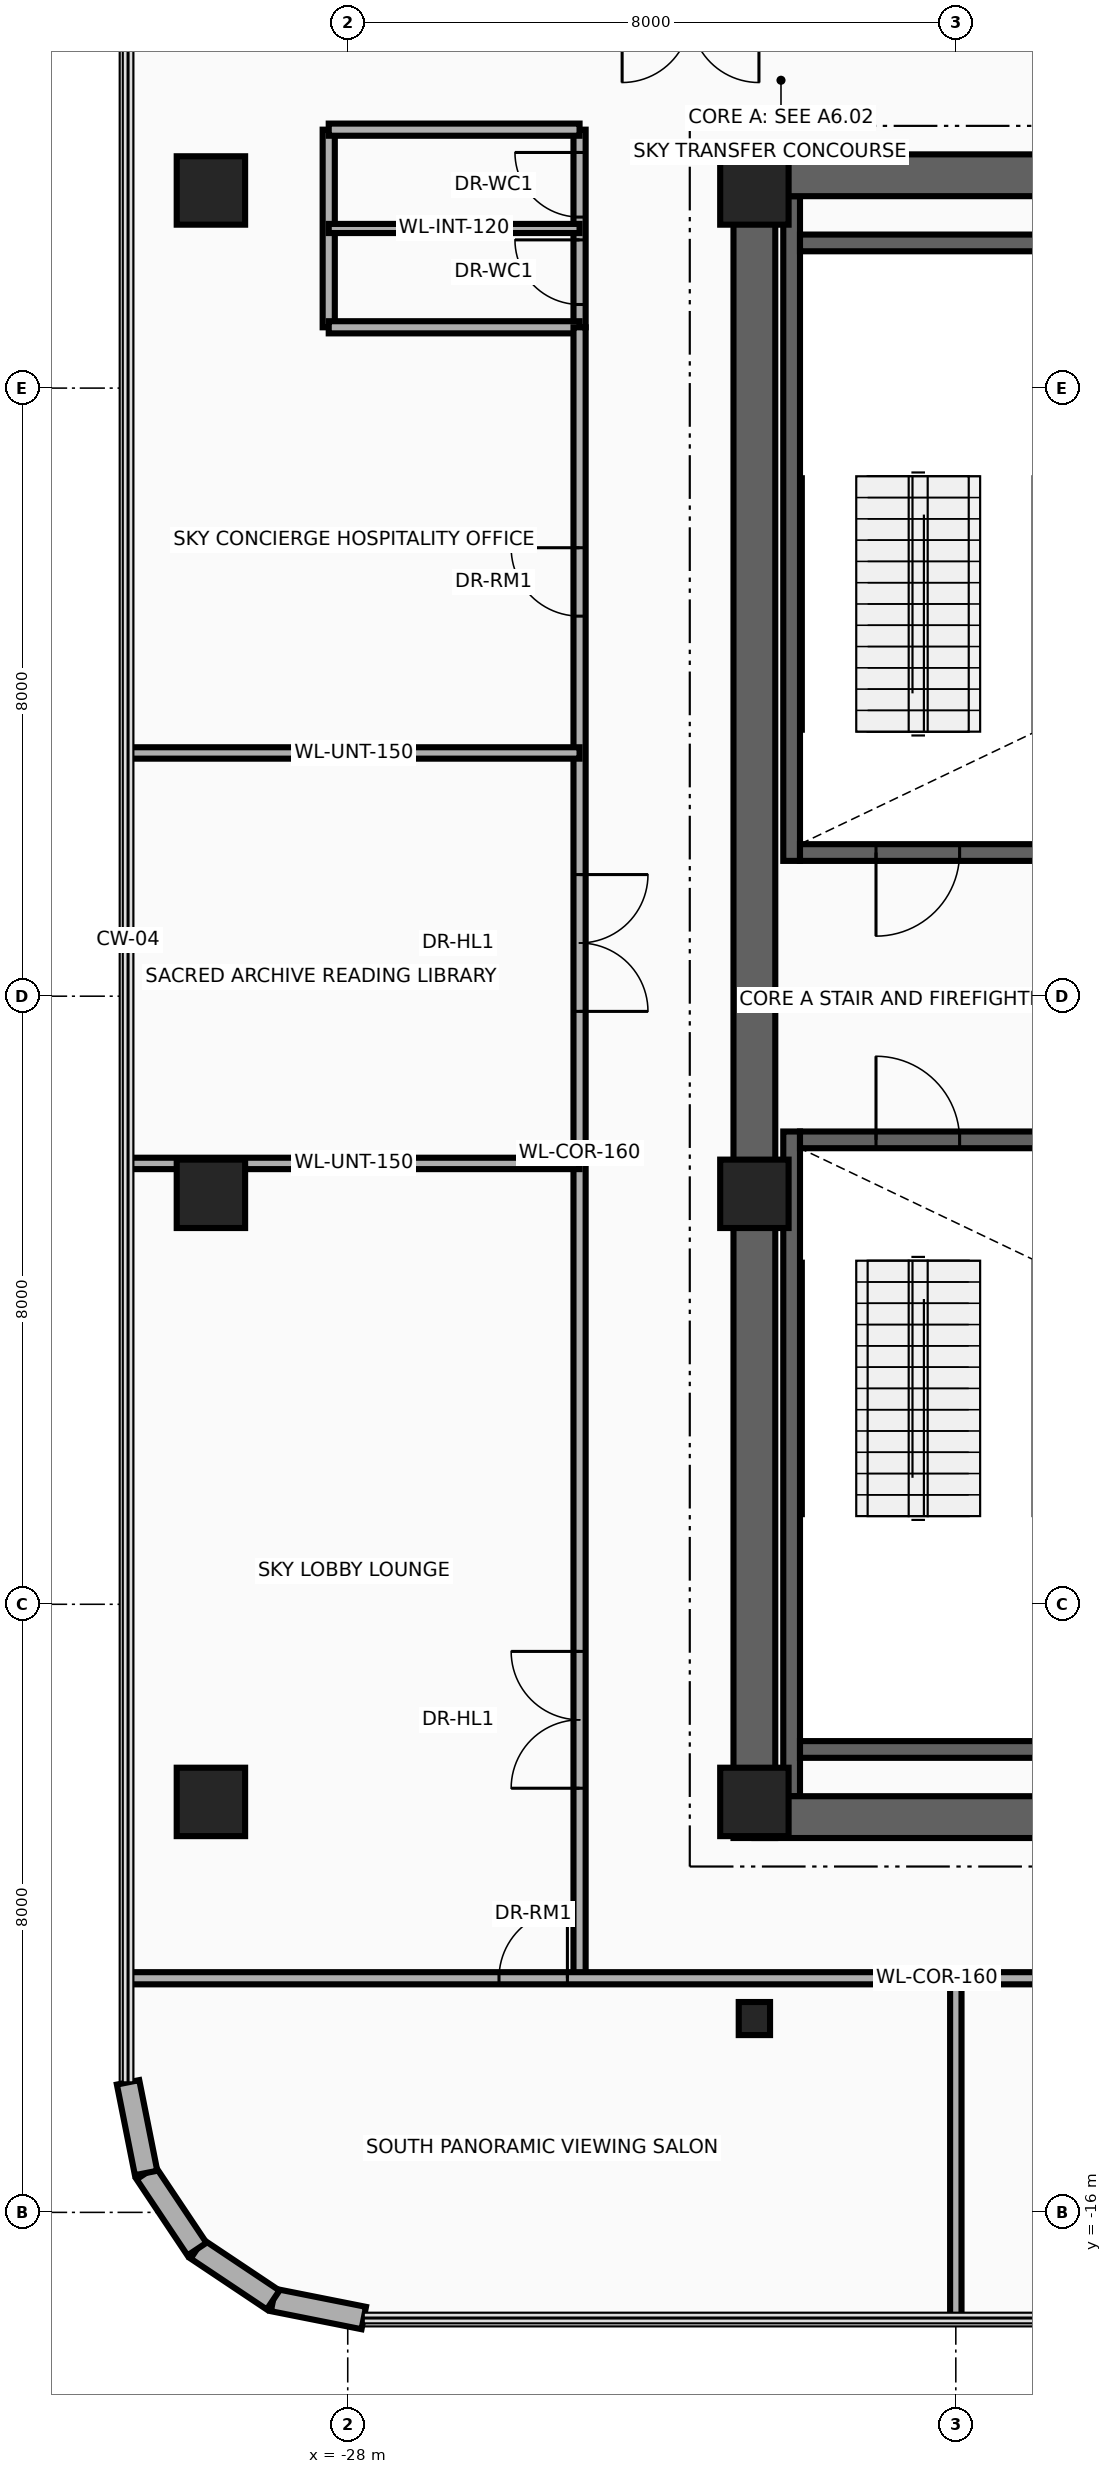
"""IFC4 building model, lengths in metres.
Left out: names, types, materials, properties, quantities, classifications, styles, units other than length and angle.
Written with IfcOpenShell. Run it as: python <this file> out.ifc"""

import sys

from ifc_helpers import new_model, si_unit, direction, frame, frame_2d, origin, origin_2d, place, context, subcontext, project, spatial, rectangle, i_section, extrude, source, transform, mapped, element, fill, save


model = new_model("IFC4")
c1 = context("Model", 3, precision=1e-05, world=origin(), true_north=direction((0.0, 1.0)))
c2 = subcontext(c1, "Body", "Model", "MODEL_VIEW")
j1 = project(units=[si_unit("LENGTHUNIT", "METRE"), si_unit("PLANEANGLEUNIT", "RADIAN")], contexts=[c1])
p1 = place(None, origin())
s1 = spatial("IfcSite", under=j1, at=p1, CompositionType="ELEMENT")
p2 = place(p1, origin())
s2 = spatial("IfcBuilding", under=s1, at=p2, CompositionType="ELEMENT")
p3 = place(p2, frame((0.0, 0.0, 201.0)))
s3 = spatial("IfcBuildingStorey", under=s2, at=p3, CompositionType="ELEMENT", Elevation=201.0)
p4 = place(p3, frame((-22.16, 1.78, 0.0), z_axis=(0.0, 0.0, 1.0), x_axis=(0.0, 1.0, 0.0)))
e1 = element("IfcWall", 1, at=p4, inside=s3, PredefinedType="SHEAR", context=c2, shape_type="SweptSolid", body=[
    extrude(rectangle(XDim=8.745, YDim=0.22, at=frame_2d((4.373, 0.0))), origin(), (0.0, 0.0, 1.0), 4.26),
])
p5 = place(p3, frame((-22.05, 1.89, 0.0), z_axis=(0.0, 0.0, 1.0), x_axis=(1.0, 0.0, 0.0)))
e2 = element("IfcWall", 2, at=p5, inside=s3, PredefinedType="SHEAR", context=c2, shape_type="SweptSolid", body=[
    extrude(rectangle(XDim=3.11, YDim=0.22, at=frame_2d((1.555, 0.0))), origin(), (0.0, 0.0, 1.0), 4.26),
])
p6 = place(p5, frame((1.0, 0.0, 0.0)))
e3 = element("IfcOpeningElement", 3, at=p6, cuts=e2, PredefinedType="OPENING", context=c2, shape_type="SweptSolid", body=[
    extrude(rectangle(XDim=1.1, YDim=2.15, at=frame_2d((0.55, 1.075))), frame((0.0, 0.125, 0.0), z_axis=(0.0, -1.0, 0.0), x_axis=(1.0, 0.0, 0.0)), (0.0, 0.0, 1.0), 0.25),
])
p7 = place(p3, frame((-22.05, 9.91, 0.0), z_axis=(0.0, 0.0, 1.0), x_axis=(1.0, 0.0, 0.0)))
e4 = element("IfcWall", 4, at=p7, inside=s3, PredefinedType="SHEAR", context=c2, shape_type="SweptSolid", body=[
    extrude(rectangle(XDim=3.11, YDim=0.22, at=frame_2d((1.555, 0.0))), origin(), (0.0, 0.0, 1.0), 4.26),
])
p8 = place(p3, frame((-22.16, -10.525, 0.0), z_axis=(0.0, 0.0, 1.0), x_axis=(0.0, 1.0, 0.0)))
e5 = element("IfcWall", 5, at=p8, inside=s3, PredefinedType="SHEAR", context=c2, shape_type="SweptSolid", body=[
    extrude(rectangle(XDim=8.745, YDim=0.22, at=frame_2d((4.373, 0.0))), origin(), (0.0, 0.0, 1.0), 4.26),
])
p9 = place(p3, frame((-22.05, -9.91, 0.0), z_axis=(0.0, 0.0, 1.0), x_axis=(1.0, 0.0, 0.0)))
e6 = element("IfcWall", 6, at=p9, inside=s3, PredefinedType="SHEAR", context=c2, shape_type="SweptSolid", body=[
    extrude(rectangle(XDim=3.11, YDim=0.22, at=frame_2d((1.555, 0.0))), origin(), (0.0, 0.0, 1.0), 4.26),
])
p10 = place(p3, frame((-22.05, -1.89, 0.0), z_axis=(0.0, 0.0, 1.0), x_axis=(1.0, 0.0, 0.0)))
e7 = element("IfcWall", 7, at=p10, inside=s3, PredefinedType="SHEAR", context=c2, shape_type="SweptSolid", body=[
    extrude(rectangle(XDim=3.11, YDim=0.22, at=frame_2d((1.555, 0.0))), origin(), (0.0, 0.0, 1.0), 4.26),
])
p11 = place(p10, frame((1.0, 0.0, 0.0)))
e8 = element("IfcOpeningElement", 8, at=p11, cuts=e7, PredefinedType="OPENING", context=c2, shape_type="SweptSolid", body=[
    extrude(rectangle(XDim=1.1, YDim=2.15, at=frame_2d((0.55, 1.075))), frame((0.0, 0.125, 0.0), z_axis=(0.0, -1.0, 0.0), x_axis=(1.0, 0.0, 0.0)), (0.0, 0.0, 1.0), 0.25),
])
p12 = place(p3, frame((-22.65, -11.075, 0.0), z_axis=(0.0, 0.0, 1.0), x_axis=(0.0, 1.0, 0.0)))
e9 = element("IfcWall", 9, at=p12, inside=s3, PredefinedType="SHEAR", context=c2, shape_type="SweptSolid", body=[
    extrude(rectangle(XDim=22.15, YDim=0.55, at=frame_2d((11.075, 0.0))), origin(), (0.0, 0.0, 1.0), 4.26),
])
for number, where, z_axis, x_axis in (
    (10, (-22.65, 10.8, 0.0), (0.0, 0.0, 1.0), (1.0, 0.0, 0.0)),
    (11, (-22.65, -10.8, 0.0), (0.0, 0.0, 1.0), (1.0, 0.0, 0.0)),
):
    element("IfcWall", number, at=place(p3, frame(where, z_axis=z_axis, x_axis=x_axis)), inside=s3, PredefinedType="SHEAR", context=c2, shape_type="SweptSolid", body=[
        extrude(rectangle(XDim=10.25, YDim=0.55, at=frame_2d((5.125, 0.0))), origin(), (0.0, 0.0, 1.0), 4.26),
    ])
m1 = source(origin(), c2, "Body", "SweptSolid", [
    extrude(rectangle(XDim=0.9, YDim=0.9, at=origin_2d()), origin(), (0.0, 0.0, 1.0), 4.5),
])
for number, where, z_axis, x_axis in (
    (12, (-29.8, -10.6, 0.0), (0.0, 0.0, 1.0), (1.0, 0.0, 0.0)),
    (13, (-22.65, -10.6, 0.0), (0.0, 0.0, 1.0), (1.0, 0.0, 0.0)),
    (14, (-29.8, -2.6, 0.0), (0.0, 0.0, 1.0), (1.0, 0.0, 0.0)),
    (15, (-22.65, -2.6, 0.0), (0.0, 0.0, 1.0), (1.0, 0.0, 0.0)),
    (16, (-29.8, 10.6, 0.0), (0.0, 0.0, 1.0), (1.0, 0.0, 0.0)),
    (17, (-22.65, 10.6, 0.0), (0.0, 0.0, 1.0), (1.0, 0.0, 0.0)),
):
    element("IfcColumn", number, at=place(p3, frame(where, z_axis=z_axis, x_axis=x_axis)), inside=s3, PredefinedType="COLUMN", context=c2, shape_type="MappedRepresentation", body=[
        mapped(m1, transform((0.0, 0.0, 0.0), x_axis=(1.0, 0.0, 0.0), y_axis=(0.0, 1.0, 0.0), z_axis=(0.0, 0.0, 1.0), scale=1.0)),
    ])
m2 = source(origin(), c2, "Body", "SweptSolid", [
    extrude(i_section(OverallWidth=0.412, OverallDepth=0.435, WebThickness=0.036, FlangeThickness=0.057, at=origin_2d()), origin(), (0.0, 0.0, 1.0), 4.5),
])
p13 = place(p3, frame((-22.65, -13.45, 0.0), z_axis=(0.0, 0.0, 1.0), x_axis=(1.0, 0.0, 0.0)))
e18 = element("IfcColumn", 18, at=p13, inside=s3, PredefinedType="COLUMN", context=c2, shape_type="MappedRepresentation", body=[
    mapped(m2, transform((0.0, 0.0, 0.0), x_axis=(1.0, 0.0, 0.0), y_axis=(0.0, 1.0, 0.0), z_axis=(0.0, 0.0, 1.0), scale=1.0)),
])
p14 = place(p3, frame((-27.789, -17.39, 0.0), z_axis=(0.0, 0.0, 1.0), x_axis=(-0.980804027463, 0.194996050505, 0.0)))
e19 = element("IfcWall", 19, at=p14, inside=s3, PredefinedType="SOLIDWALL", context=c2, shape_type="SweptSolid", body=[
    extrude(rectangle(XDim=1.216, YDim=0.3, at=frame_2d((0.608, 0.0))), origin(), (0.0, 0.0, 1.0), 4.26),
])
for number, where, z_axis, x_axis in (
    (20, (-28.982, -17.153, 0.0), (0.0, 0.0, 1.0), (-0.831, 0.556, 0.0)),
    (21, (-29.983, -16.483, 0.0), (0.0, 0.0, 1.0), (-0.556, 0.831, 0.0)),
):
    element("IfcWall", number, at=place(p3, frame(where, z_axis=z_axis, x_axis=x_axis)), inside=s3, PredefinedType="SOLIDWALL", context=c2, shape_type="SweptSolid", body=[
        extrude(rectangle(XDim=1.205, YDim=0.3, at=frame_2d((0.603, 0.0))), origin(), (0.0, 0.0, 1.0), 4.26),
    ])
p15 = place(p3, frame((-30.653, -15.482, 0.0), z_axis=(0.0, 0.0, 1.0), x_axis=(-0.194996050505, 0.980804027463, 0.0)))
e22 = element("IfcWall", 22, at=p15, inside=s3, PredefinedType="SOLIDWALL", context=c2, shape_type="SweptSolid", body=[
    extrude(rectangle(XDim=1.216, YDim=0.3, at=frame_2d((0.608, 0.0))), origin(), (0.0, 0.0, 1.0), 4.26),
])
p16 = place(p3, frame((-28.25, 8.8, 0.0), z_axis=(0.0, 0.0, 1.0), x_axis=(0.0, 1.0, 0.0)))
e23 = element("IfcWall", 23, at=p16, inside=s3, PredefinedType="PARTITIONING", context=c2, shape_type="SweptSolid", body=[
    extrude(rectangle(XDim=2.6, YDim=0.16, at=frame_2d((1.3, 0.0))), origin(), (0.0, 0.0, 1.0), 3.544),
])
p17 = place(p3, frame((-24.95, 8.8, 0.0), z_axis=(0.0, 0.0, 1.0), x_axis=(0.0, 1.0, 0.0)))
e24 = element("IfcWall", 24, at=p17, inside=s3, PredefinedType="PARTITIONING", context=c2, shape_type="SweptSolid", body=[
    extrude(rectangle(XDim=2.6, YDim=0.16, at=frame_2d((1.3, 0.0))), origin(), (0.0, 0.0, 1.0), 3.544),
])
p18 = place(p17, frame((0.3, 0.0, 0.0)))
e25 = element("IfcOpeningElement", 25, at=p18, cuts=e24, PredefinedType="OPENING", context=c2, shape_type="SweptSolid", body=[
    extrude(rectangle(XDim=0.85, YDim=2.1, at=frame_2d((0.425, 1.05))), frame((0.0, 0.095, 0.0), z_axis=(0.0, -1.0, 0.0), x_axis=(1.0, 0.0, 0.0)), (0.0, 0.0, 1.0), 0.19),
])
p19 = place(p17, frame((1.45, 0.0, 0.0)))
e26 = element("IfcOpeningElement", 26, at=p19, cuts=e24, PredefinedType="OPENING", context=c2, shape_type="SweptSolid", body=[
    extrude(rectangle(XDim=0.85, YDim=2.1, at=frame_2d((0.425, 1.05))), frame((0.0, 0.095, 0.0), z_axis=(0.0, -1.0, 0.0), x_axis=(1.0, 0.0, 0.0)), (0.0, 0.0, 1.0), 0.19),
])
for number, where, z_axis, x_axis in (
    (27, (-28.25, 8.8, 0.0), (0.0, 0.0, 1.0), (1.0, 0.0, 0.0)),
    (28, (-28.25, 11.4, 0.0), (0.0, 0.0, 1.0), (1.0, 0.0, 0.0)),
):
    element("IfcWall", number, at=place(p3, frame(where, z_axis=z_axis, x_axis=x_axis)), inside=s3, PredefinedType="PARTITIONING", context=c2, shape_type="SweptSolid", body=[
        extrude(rectangle(XDim=3.3, YDim=0.16, at=frame_2d((1.65, 0.0))), origin(), (0.0, 0.0, 1.0), 4.26),
    ])
p20 = place(p3, frame((-28.25, 10.1, 0.0), z_axis=(0.0, 0.0, 1.0), x_axis=(1.0, 0.0, 0.0)))
e29 = element("IfcWall", 29, at=p20, inside=s3, PredefinedType="PARTITIONING", context=c2, shape_type="SweptSolid", body=[
    extrude(rectangle(XDim=3.3, YDim=0.12, at=frame_2d((1.65, 0.0))), origin(), (0.0, 0.0, 1.0), 4.26),
])
p21 = place(p3, frame((-24.95, -12.92, 0.0), z_axis=(0.0, 0.0, 1.0), x_axis=(0.0, 1.0, 0.0)))
e30 = element("IfcWall", 30, at=p21, inside=s3, PredefinedType="PARTITIONING", context=c2, shape_type="SweptSolid", body=[
    extrude(rectangle(XDim=21.72, YDim=0.16, at=frame_2d((10.86, 0.0))), origin(), (0.0, 0.0, 1.0), 3.544),
])
p22 = place(p21, frame((2.5, 0.0, 0.0)))
e31 = element("IfcOpeningElement", 31, at=p22, cuts=e30, PredefinedType="OPENING", context=c2, shape_type="SweptSolid", body=[
    extrude(rectangle(XDim=1.8, YDim=2.15, at=frame_2d((0.9, 1.075))), frame((0.0, 0.095, 0.0), z_axis=(0.0, -1.0, 0.0), x_axis=(1.0, 0.0, 0.0)), (0.0, 0.0, 1.0), 0.19),
])
p23 = place(p21, frame((12.72, 0.0, 0.0)))
e32 = element("IfcOpeningElement", 32, at=p23, cuts=e30, PredefinedType="OPENING", context=c2, shape_type="SweptSolid", body=[
    extrude(rectangle(XDim=1.8, YDim=2.15, at=frame_2d((0.9, 1.075))), frame((0.0, 0.095, 0.0), z_axis=(0.0, -1.0, 0.0), x_axis=(1.0, 0.0, 0.0)), (0.0, 0.0, 1.0), 0.19),
])
p24 = place(p21, frame((17.92, 0.0, 0.0)))
e33 = element("IfcOpeningElement", 33, at=p24, cuts=e30, PredefinedType="OPENING", context=c2, shape_type="SweptSolid", body=[
    extrude(rectangle(XDim=0.9, YDim=2.1, at=frame_2d((0.45, 1.05))), frame((0.0, 0.095, 0.0), z_axis=(0.0, -1.0, 0.0), x_axis=(1.0, 0.0, 0.0)), (0.0, 0.0, 1.0), 0.19),
])
p25 = place(p3, frame((-30.89, -2.2, 0.0), z_axis=(0.0, 0.0, 1.0), x_axis=(1.0, 0.0, 0.0)))
e34 = element("IfcWall", 34, at=p25, inside=s3, PredefinedType="PARTITIONING", context=c2, shape_type="SweptSolid", body=[
    extrude(rectangle(XDim=5.94, YDim=0.15, at=frame_2d((2.97, 0.0))), origin(), (0.0, 0.0, 1.0), 3.245),
])
p26 = place(p3, frame((-30.89, 3.2, 0.0), z_axis=(0.0, 0.0, 1.0), x_axis=(1.0, 0.0, 0.0)))
e35 = element("IfcWall", 35, at=p26, inside=s3, PredefinedType="PARTITIONING", context=c2, shape_type="SweptSolid", body=[
    extrude(rectangle(XDim=5.94, YDim=0.15, at=frame_2d((2.97, 0.0))), origin(), (0.0, 0.0, 1.0), 3.706),
])
p27 = place(p3, frame((-30.89, -12.92, 0.0), z_axis=(0.0, 0.0, 1.0), x_axis=(1.0, 0.0, 0.0)))
e36 = element("IfcWall", 36, at=p27, inside=s3, PredefinedType="PARTITIONING", context=c2, shape_type="SweptSolid", body=[
    extrude(rectangle(XDim=21.28, YDim=0.16, at=frame_2d((10.64, 0.0))), origin(), (0.0, 0.0, 1.0), 3.634),
])
p28 = place(p27, frame((4.88, 0.0, 0.0)))
e37 = element("IfcOpeningElement", 37, at=p28, cuts=e36, PredefinedType="OPENING", context=c2, shape_type="SweptSolid", body=[
    extrude(rectangle(XDim=0.9, YDim=2.1, at=frame_2d((0.45, 1.05))), frame((0.0, 0.095, 0.0), z_axis=(0.0, -1.0, 0.0), x_axis=(1.0, 0.0, 0.0)), (0.0, 0.0, 1.0), 0.19),
])
p29 = place(p27, frame((14.5, 0.0, 0.0)))
e38 = element("IfcOpeningElement", 38, at=p29, cuts=e36, PredefinedType="OPENING", context=c2, shape_type="SweptSolid", body=[
    extrude(rectangle(XDim=0.9, YDim=2.1, at=frame_2d((0.45, 1.05))), frame((0.0, 0.095, 0.0), z_axis=(0.0, -1.0, 0.0), x_axis=(1.0, 0.0, 0.0)), (0.0, 0.0, 1.0), 0.19),
])
p30 = place(p3, frame((-20.0, -17.39, 0.0), z_axis=(0.0, 0.0, 1.0), x_axis=(0.0, 1.0, 0.0)))
e39 = element("IfcWall", 39, at=p30, inside=s3, PredefinedType="PARTITIONING", context=c2, shape_type="SweptSolid", body=[
    extrude(rectangle(XDim=4.47, YDim=0.15, at=frame_2d((2.235, 0.0))), origin(), (0.0, 0.0, 1.0), 3.706),
])
p31 = place(p6, frame((1.1, 0.0, 0.0), z_axis=(0.0, 0.0, 1.0), x_axis=(-1.0, 0.0, 0.0)))
e40 = element("IfcDoor", 40, at=p31, inside=s3, OperationType="SINGLE_SWING_LEFT", PredefinedType="DOOR", context=c2, shape_type="SweptSolid", body=[
    extrude(rectangle(XDim=1.1, YDim=2.15, at=frame_2d((0.55, 1.075))), frame((0.0, 0.025, 0.0), z_axis=(0.0, -1.0, 0.0), x_axis=(1.0, 0.0, 0.0)), (0.0, 0.0, 1.0), 0.05),
])
fill(e3, e40)
p32 = place(p11, origin())
e41 = element("IfcDoor", 41, at=p32, inside=s3, OperationType="SINGLE_SWING_RIGHT", PredefinedType="DOOR", context=c2, shape_type="SweptSolid", body=[
    extrude(rectangle(XDim=1.1, YDim=2.15, at=frame_2d((0.55, 1.075))), frame((0.0, 0.025, 0.0), z_axis=(0.0, -1.0, 0.0), x_axis=(1.0, 0.0, 0.0)), (0.0, 0.0, 1.0), 0.05),
])
fill(e8, e41)
p33 = place(p18, origin())
e42 = element("IfcDoor", 42, at=p33, inside=s3, OperationType="SINGLE_SWING_RIGHT", PredefinedType="DOOR", context=c2, shape_type="SweptSolid", body=[
    extrude(rectangle(XDim=0.85, YDim=2.1, at=frame_2d((0.425, 1.05))), frame((0.0, 0.025, 0.0), z_axis=(0.0, -1.0, 0.0), x_axis=(1.0, 0.0, 0.0)), (0.0, 0.0, 1.0), 0.05),
])
fill(e25, e42)
p34 = place(p19, origin())
e43 = element("IfcDoor", 43, at=p34, inside=s3, OperationType="SINGLE_SWING_LEFT", PredefinedType="DOOR", context=c2, shape_type="SweptSolid", body=[
    extrude(rectangle(XDim=0.85, YDim=2.1, at=frame_2d((0.425, 1.05))), frame((0.0, 0.025, 0.0), z_axis=(0.0, -1.0, 0.0), x_axis=(1.0, 0.0, 0.0)), (0.0, 0.0, 1.0), 0.05),
])
fill(e26, e43)
p35 = place(p22, origin())
e44 = element("IfcDoor", 44, at=p35, inside=s3, OperationType="DOUBLE_DOOR_SINGLE_SWING", PredefinedType="DOOR", context=c2, shape_type="SweptSolid", body=[
    extrude(rectangle(XDim=1.8, YDim=2.15, at=frame_2d((0.9, 1.075))), frame((0.0, 0.025, 0.0), z_axis=(0.0, -1.0, 0.0), x_axis=(1.0, 0.0, 0.0)), (0.0, 0.0, 1.0), 0.05),
])
fill(e31, e44)
p36 = place(p23, frame((1.8, 0.0, 0.0), z_axis=(0.0, 0.0, 1.0), x_axis=(-1.0, 0.0, 0.0)))
e45 = element("IfcDoor", 45, at=p36, inside=s3, OperationType="DOUBLE_DOOR_SINGLE_SWING", PredefinedType="DOOR", context=c2, shape_type="SweptSolid", body=[
    extrude(rectangle(XDim=1.8, YDim=2.15, at=frame_2d((0.9, 1.075))), frame((0.0, 0.025, 0.0), z_axis=(0.0, -1.0, 0.0), x_axis=(1.0, 0.0, 0.0)), (0.0, 0.0, 1.0), 0.05),
])
fill(e32, e45)
p37 = place(p24, origin())
e46 = element("IfcDoor", 46, at=p37, inside=s3, OperationType="SINGLE_SWING_RIGHT", PredefinedType="DOOR", context=c2, shape_type="SweptSolid", body=[
    extrude(rectangle(XDim=0.9, YDim=2.1, at=frame_2d((0.45, 1.05))), frame((0.0, 0.025, 0.0), z_axis=(0.0, -1.0, 0.0), x_axis=(1.0, 0.0, 0.0)), (0.0, 0.0, 1.0), 0.05),
])
fill(e33, e46)
p38 = place(p28, origin())
e47 = element("IfcDoor", 47, at=p38, inside=s3, OperationType="SINGLE_SWING_RIGHT", PredefinedType="DOOR", context=c2, shape_type="SweptSolid", body=[
    extrude(rectangle(XDim=0.9, YDim=2.1, at=frame_2d((0.45, 1.05))), frame((0.0, 0.025, 0.0), z_axis=(0.0, -1.0, 0.0), x_axis=(1.0, 0.0, 0.0)), (0.0, 0.0, 1.0), 0.05),
])
fill(e37, e47)
save(model, sys.argv[1])
